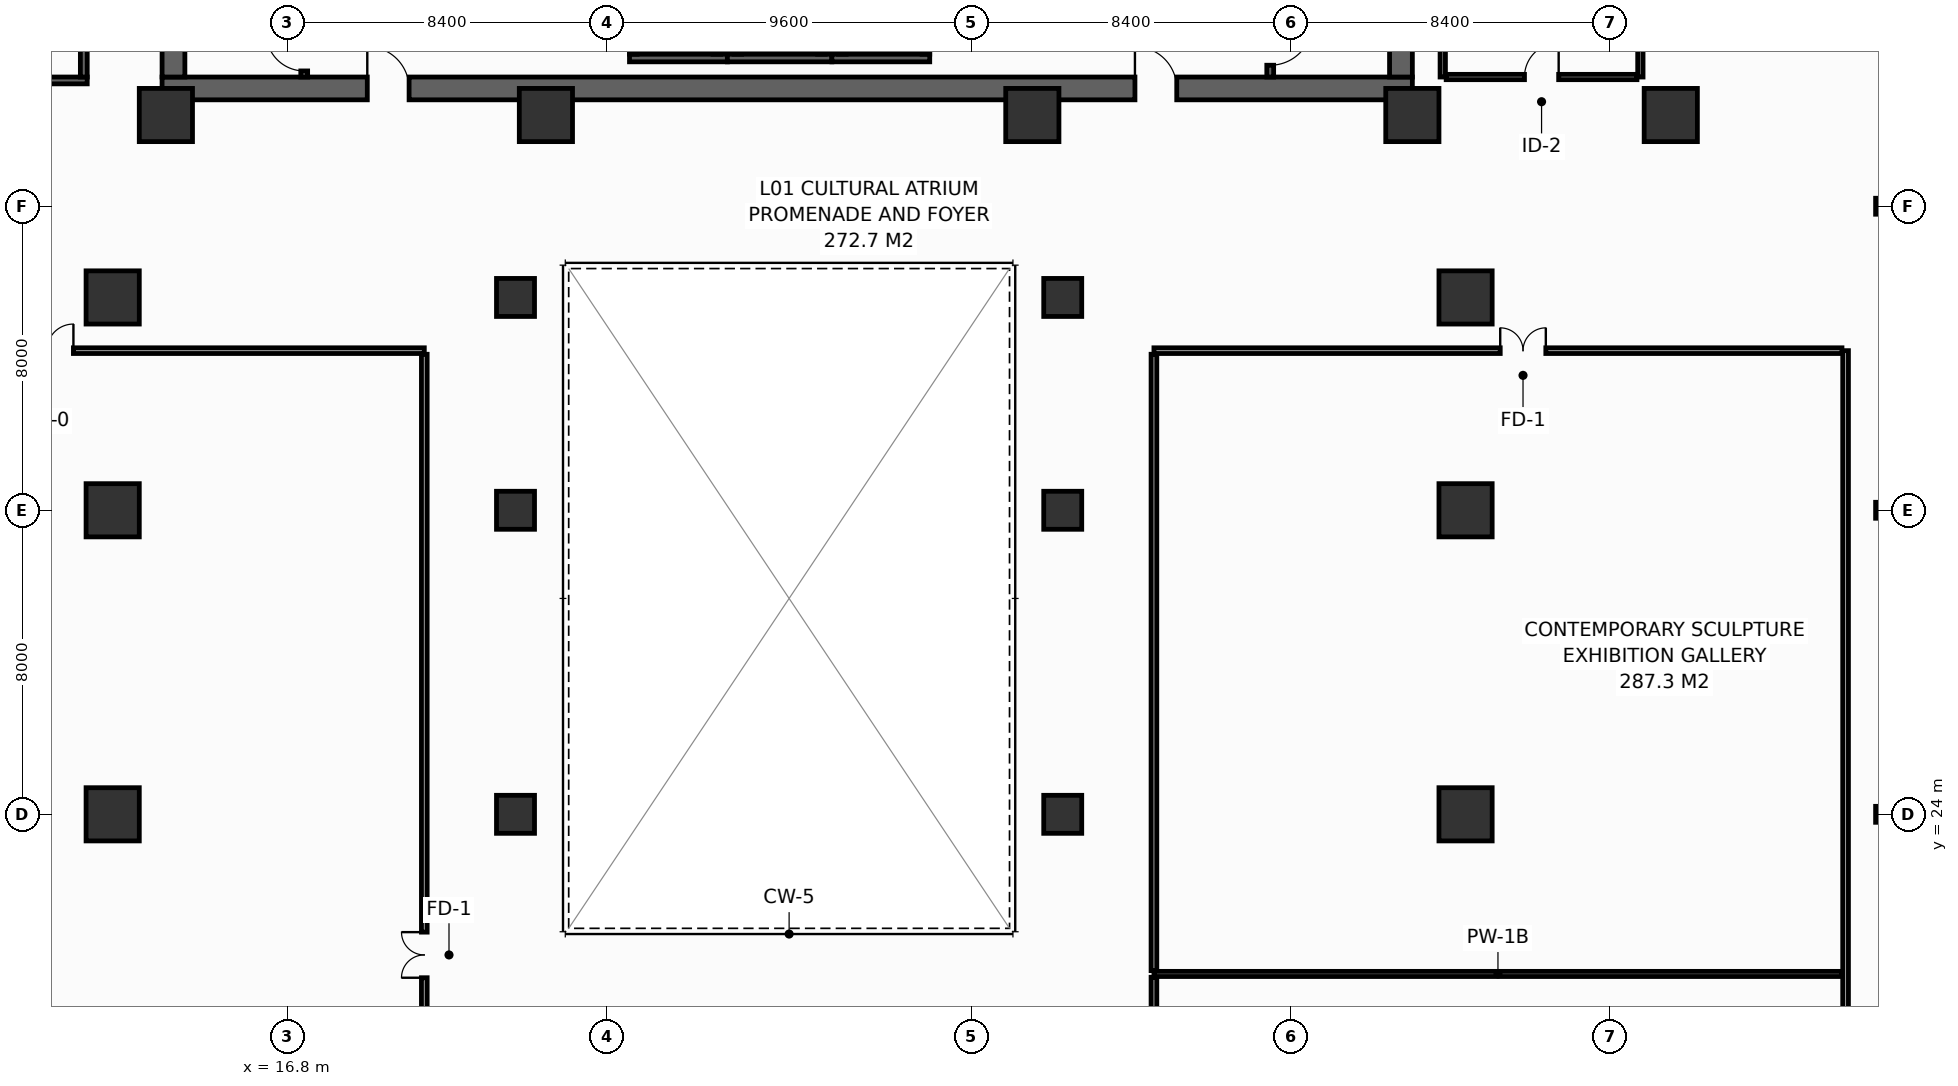
"""IFC4 building model, lengths in metres.
Left out: names, types, materials, properties, quantities, classifications, styles, units other than length and angle.
Written with IfcOpenShell. Run it as: python <this file> out.ifc"""

import sys

from ifc_helpers import new_model, si_unit, direction, frame, frame_2d, origin, origin_2d, place, context, subcontext, project, spatial, rectangle, hollow_rectangle, i_section, extrude, element, fill, save


model = new_model("IFC4")
c1 = context("Model", 3, precision=1e-05, world=origin(), true_north=direction((0.0, 1.0)))
c2 = subcontext(c1, "Body", "Model", "MODEL_VIEW")
j1 = project(units=[si_unit("LENGTHUNIT", "METRE"), si_unit("PLANEANGLEUNIT", "RADIAN")], contexts=[c1])
p1 = place(None, origin())
s1 = spatial("IfcSite", under=j1, at=p1, CompositionType="ELEMENT")
p2 = place(p1, origin())
s2 = spatial("IfcBuilding", under=s1, at=p2, CompositionType="ELEMENT")
p3 = place(p2, frame((0.0, 0.0, 6.0)))
s3 = spatial("IfcBuildingStorey", under=s2, at=p3, CompositionType="ELEMENT", Elevation=6.0)
p4 = place(p3, frame((13.5, 43.1, 0.0), z_axis=(0.0, 0.0, 1.0), x_axis=(1.0, 0.0, 0.0)))
e1 = element("IfcWall", 1, at=p4, inside=s3, PredefinedType="SHEAR", context=c2, shape_type="SweptSolid", body=[
    extrude(rectangle(XDim=32.9, YDim=0.6, at=frame_2d((16.45, 0.0))), origin(), (0.0, 0.0, 1.0), 5.1),
])
p5 = place(p4, frame((5.4, 0.0, 0.0)))
e2 = element("IfcOpeningElement", 2, at=p5, cuts=e1, PredefinedType="OPENING", context=c2, shape_type="SweptSolid", body=[
    extrude(rectangle(XDim=1.1, YDim=2.15, at=frame_2d((0.55, 1.075))), frame((0.0, 0.31, 0.0), z_axis=(0.0, -1.0, 0.0), x_axis=(1.0, 0.0, 0.0)), (0.0, 0.0, 1.0), 0.62),
])
p6 = place(p4, frame((25.6, 0.0, 0.0)))
e3 = element("IfcOpeningElement", 3, at=p6, cuts=e1, PredefinedType="OPENING", context=c2, shape_type="SweptSolid", body=[
    extrude(rectangle(XDim=1.1, YDim=2.15, at=frame_2d((0.55, 1.075))), frame((0.0, 0.31, 0.0), z_axis=(0.0, -1.0, 0.0), x_axis=(1.0, 0.0, 0.0)), (0.0, 0.0, 1.0), 0.62),
])
for number, where, z_axis, x_axis in (
    (4, (13.8, 43.4, 0.0), (0.0, 0.0, 1.0), (0.0, 1.0, 0.0)),
    (5, (46.1, 43.4, 0.0), (0.0, 0.0, 1.0), (0.0, 1.0, 0.0)),
):
    element("IfcWall", number, at=place(p3, frame(where, z_axis=z_axis, x_axis=x_axis)), inside=s3, PredefinedType="SHEAR", context=c2, shape_type="SweptSolid", body=[
        extrude(rectangle(XDim=10.4, YDim=0.6, at=frame_2d((5.2, 0.0))), origin(), (0.0, 0.0, 1.0), 5.1),
    ])
for number, where, z_axis, x_axis in (
    (6, (13.6, 42.4, 0.0), (0.0, 0.0, 1.0), (1.0, 0.0, 0.0)),
    (7, (23.6, 42.4, 0.0), (0.0, 0.0, 1.0), (1.0, 0.0, 0.0)),
    (8, (36.4, 42.4, 0.0), (0.0, 0.0, 1.0), (1.0, 0.0, 0.0)),
    (9, (46.4, 42.4, 0.0), (0.0, 0.0, 1.0), (1.0, 0.0, 0.0)),
    (10, (53.2, 42.4, 0.0), (0.0, 0.0, 1.0), (1.0, 0.0, 0.0)),
    (11, (12.2, 24.0, 0.0), (0.0, 0.0, 1.0), (1.0, 0.0, 0.0)),
):
    element("IfcColumn", number, at=place(p3, frame(where, z_axis=z_axis, x_axis=x_axis)), inside=s3, PredefinedType="COLUMN", context=c2, shape_type="SweptSolid", body=[
        extrude(hollow_rectangle(XDim=1.4, YDim=1.4, WallThickness=0.065, at=origin_2d()), origin(), (0.0, 0.0, 1.0), 5.4),
    ])
for number, where, z_axis, x_axis in (
    (12, (22.8, 24.0, 0.0), (0.0, 0.0, 1.0), (1.0, 0.0, 0.0)),
    (13, (37.2, 24.0, 0.0), (0.0, 0.0, 1.0), (1.0, 0.0, 0.0)),
):
    element("IfcColumn", number, at=place(p3, frame(where, z_axis=z_axis, x_axis=x_axis)), inside=s3, PredefinedType="COLUMN", context=c2, shape_type="SweptSolid", body=[
        extrude(hollow_rectangle(XDim=1.0, YDim=1.0, WallThickness=0.045, at=origin_2d()), origin(), (0.0, 0.0, 1.0), 5.4),
    ])
for number, where, z_axis, x_axis in (
    (14, (47.8, 24.0, 0.0), (0.0, 0.0, 1.0), (1.0, 0.0, 0.0)),
    (15, (12.2, 32.0, 0.0), (0.0, 0.0, 1.0), (1.0, 0.0, 0.0)),
):
    element("IfcColumn", number, at=place(p3, frame(where, z_axis=z_axis, x_axis=x_axis)), inside=s3, PredefinedType="COLUMN", context=c2, shape_type="SweptSolid", body=[
        extrude(hollow_rectangle(XDim=1.4, YDim=1.4, WallThickness=0.065, at=origin_2d()), origin(), (0.0, 0.0, 1.0), 5.4),
    ])
for number, where, z_axis, x_axis in (
    (16, (22.8, 32.0, 0.0), (0.0, 0.0, 1.0), (1.0, 0.0, 0.0)),
    (17, (37.2, 32.0, 0.0), (0.0, 0.0, 1.0), (1.0, 0.0, 0.0)),
):
    element("IfcColumn", number, at=place(p3, frame(where, z_axis=z_axis, x_axis=x_axis)), inside=s3, PredefinedType="COLUMN", context=c2, shape_type="SweptSolid", body=[
        extrude(hollow_rectangle(XDim=1.0, YDim=1.0, WallThickness=0.045, at=origin_2d()), origin(), (0.0, 0.0, 1.0), 5.4),
    ])
for number, where, z_axis, x_axis in (
    (18, (47.8, 32.0, 0.0), (0.0, 0.0, 1.0), (1.0, 0.0, 0.0)),
    (19, (12.2, 37.6, 0.0), (0.0, 0.0, 1.0), (1.0, 0.0, 0.0)),
):
    element("IfcColumn", number, at=place(p3, frame(where, z_axis=z_axis, x_axis=x_axis)), inside=s3, PredefinedType="COLUMN", context=c2, shape_type="SweptSolid", body=[
        extrude(hollow_rectangle(XDim=1.4, YDim=1.4, WallThickness=0.065, at=origin_2d()), origin(), (0.0, 0.0, 1.0), 5.4),
    ])
for number, where, z_axis, x_axis in (
    (20, (22.8, 37.6, 0.0), (0.0, 0.0, 1.0), (1.0, 0.0, 0.0)),
    (21, (37.2, 37.6, 0.0), (0.0, 0.0, 1.0), (1.0, 0.0, 0.0)),
):
    element("IfcColumn", number, at=place(p3, frame(where, z_axis=z_axis, x_axis=x_axis)), inside=s3, PredefinedType="COLUMN", context=c2, shape_type="SweptSolid", body=[
        extrude(hollow_rectangle(XDim=1.0, YDim=1.0, WallThickness=0.045, at=origin_2d()), origin(), (0.0, 0.0, 1.0), 5.4),
    ])
p7 = place(p3, frame((47.8, 37.6, 0.0), z_axis=(0.0, 0.0, 1.0), x_axis=(1.0, 0.0, 0.0)))
e22 = element("IfcColumn", 22, at=p7, inside=s3, PredefinedType="COLUMN", context=c2, shape_type="SweptSolid", body=[
    extrude(hollow_rectangle(XDim=1.4, YDim=1.4, WallThickness=0.065, at=origin_2d()), origin(), (0.0, 0.0, 1.0), 5.4),
])
for number, where, z_axis, x_axis in (
    (23, (58.8, 24.0, 0.0), (0.0, 0.0, 1.0), (1.0, 0.0, 0.0)),
    (24, (58.8, 32.0, 0.0), (0.0, 0.0, 1.0), (1.0, 0.0, 0.0)),
    (25, (58.8, 40.0, 0.0), (0.0, 0.0, 1.0), (1.0, 0.0, 0.0)),
):
    element("IfcColumn", number, at=place(p3, frame(where, z_axis=z_axis, x_axis=x_axis)), inside=s3, PredefinedType="COLUMN", context=c2, shape_type="SweptSolid", body=[
        extrude(i_section(OverallWidth=0.42, OverallDepth=0.42, WebThickness=0.02, FlangeThickness=0.035, FilletRadius=0.022, at=origin_2d()), origin(), (0.0, 0.0, 1.0), 5.4),
    ])
p8 = place(p3, frame((25.8, 43.9, 0.0), z_axis=(0.0, 0.0, 1.0), x_axis=(1.0, 0.0, 0.0)))
e26 = element("IfcWall", 26, at=p8, inside=s3, PredefinedType="SHEAR", context=c2, shape_type="SweptSolid", body=[
    extrude(rectangle(XDim=2.575, YDim=0.2, at=frame_2d((1.288, 0.0))), origin(), (0.0, 0.0, 1.0), 5.1),
])
for number, where, z_axis, x_axis in (
    (27, (25.9, 44.0, 0.0), (0.0, 0.0, 1.0), (0.0, 1.0, 0.0)),
    (28, (28.1, 44.0, 0.0), (0.0, 0.0, 1.0), (0.0, 1.0, 0.0)),
):
    element("IfcWall", number, at=place(p3, frame(where, z_axis=z_axis, x_axis=x_axis)), inside=s3, PredefinedType="SHEAR", context=c2, shape_type="SweptSolid", body=[
        extrude(rectangle(XDim=2.3, YDim=0.2, at=frame_2d((1.15, 0.0))), origin(), (0.0, 0.0, 1.0), 5.1),
    ])
p9 = place(p3, frame((28.375, 43.9, 0.0), z_axis=(0.0, 0.0, 1.0), x_axis=(1.0, 0.0, 0.0)))
e29 = element("IfcWall", 29, at=p9, inside=s3, PredefinedType="SHEAR", context=c2, shape_type="SweptSolid", body=[
    extrude(rectangle(XDim=2.75, YDim=0.2, at=frame_2d((1.375, 0.0))), origin(), (0.0, 0.0, 1.0), 5.1),
])
for number, where, z_axis, x_axis in (
    (30, (28.65, 44.0, 0.0), (0.0, 0.0, 1.0), (0.0, 1.0, 0.0)),
    (31, (30.85, 44.0, 0.0), (0.0, 0.0, 1.0), (0.0, 1.0, 0.0)),
):
    element("IfcWall", number, at=place(p3, frame(where, z_axis=z_axis, x_axis=x_axis)), inside=s3, PredefinedType="SHEAR", context=c2, shape_type="SweptSolid", body=[
        extrude(rectangle(XDim=2.3, YDim=0.2, at=frame_2d((1.15, 0.0))), origin(), (0.0, 0.0, 1.0), 5.1),
    ])
p10 = place(p3, frame((31.125, 43.9, 0.0), z_axis=(0.0, 0.0, 1.0), x_axis=(1.0, 0.0, 0.0)))
e32 = element("IfcWall", 32, at=p10, inside=s3, PredefinedType="SHEAR", context=c2, shape_type="SweptSolid", body=[
    extrude(rectangle(XDim=2.575, YDim=0.2, at=frame_2d((1.288, 0.0))), origin(), (0.0, 0.0, 1.0), 5.1),
])
for number, where, z_axis, x_axis in (
    (33, (31.4, 44.0, 0.0), (0.0, 0.0, 1.0), (0.0, 1.0, 0.0)),
    (34, (33.6, 44.0, 0.0), (0.0, 0.0, 1.0), (0.0, 1.0, 0.0)),
):
    element("IfcWall", number, at=place(p3, frame(where, z_axis=z_axis, x_axis=x_axis)), inside=s3, PredefinedType="SHEAR", context=c2, shape_type="SweptSolid", body=[
        extrude(rectangle(XDim=2.3, YDim=0.2, at=frame_2d((1.15, 0.0))), origin(), (0.0, 0.0, 1.0), 5.1),
    ])
p11 = place(p3, frame((17.24, 43.4, 0.0), z_axis=(0.0, 0.0, 1.0), x_axis=(0.0, 1.0, 0.0)))
e35 = element("IfcWall", 35, at=p11, inside=s3, PredefinedType="SHEAR", context=c2, shape_type="SweptSolid", body=[
    extrude(rectangle(XDim=10.4, YDim=0.18, at=frame_2d((5.2, 0.0))), origin(), (0.0, 0.0, 1.0), 5.1),
])
p12 = place(p11, frame((0.16, 0.0, 0.0)))
e36 = element("IfcOpeningElement", 36, at=p12, cuts=e35, PredefinedType="OPENING", context=c2, shape_type="SweptSolid", body=[
    extrude(rectangle(XDim=1.0, YDim=2.15, at=frame_2d((0.5, 1.075))), frame((0.0, 0.1, 0.0), z_axis=(0.0, -1.0, 0.0), x_axis=(1.0, 0.0, 0.0)), (0.0, 0.0, 1.0), 0.2),
])
p13 = place(p3, frame((42.66, 53.8, 0.0), z_axis=(0.0, 0.0, 1.0), x_axis=(0.0, -1.0, 0.0)))
e37 = element("IfcWall", 37, at=p13, inside=s3, PredefinedType="SHEAR", context=c2, shape_type="SweptSolid", body=[
    extrude(rectangle(XDim=10.4, YDim=0.18, at=frame_2d((5.2, 0.0))), origin(), (0.0, 0.0, 1.0), 5.1),
])
p14 = place(p13, frame((8.99, 0.0, 0.0)))
e38 = element("IfcOpeningElement", 38, at=p14, cuts=e37, PredefinedType="OPENING", context=c2, shape_type="SweptSolid", body=[
    extrude(rectangle(XDim=1.1, YDim=2.15, at=frame_2d((0.55, 1.075))), frame((0.0, 0.1, 0.0), z_axis=(0.0, -1.0, 0.0), x_axis=(1.0, 0.0, 0.0)), (0.0, 0.0, 1.0), 0.2),
])
p15 = place(p3, frame((8.12, 43.31, 0.0), z_axis=(0.0, 0.0, 1.0), x_axis=(1.0, 0.0, 0.0)))
e39 = element("IfcWall", 39, at=p15, inside=s3, PredefinedType="SHEAR", context=c2, shape_type="SweptSolid", body=[
    extrude(rectangle(XDim=3.41, YDim=0.18, at=frame_2d((1.705, 0.0))), origin(), (0.0, 0.0, 1.0), 5.1),
])
p16 = place(p15, frame((1.15, 0.0, 0.0)))
e40 = element("IfcOpeningElement", 40, at=p16, cuts=e39, PredefinedType="OPENING", context=c2, shape_type="SweptSolid", body=[
    extrude(rectangle(XDim=1.1, YDim=2.15, at=frame_2d((0.55, 1.075))), frame((0.0, 0.1, 0.0), z_axis=(0.0, -1.0, 0.0), x_axis=(1.0, 0.0, 0.0)), (0.0, 0.0, 1.0), 0.2),
])
p17 = place(p3, frame((11.44, 43.4, 0.0), z_axis=(0.0, 0.0, 1.0), x_axis=(0.0, 1.0, 0.0)))
e41 = element("IfcWall", 41, at=p17, inside=s3, PredefinedType="SHEAR", context=c2, shape_type="SweptSolid", body=[
    extrude(rectangle(XDim=10.4, YDim=0.18, at=frame_2d((5.2, 0.0))), origin(), (0.0, 0.0, 1.0), 5.1),
])
p18 = place(p3, frame((2.295, 36.2, 0.0), z_axis=(0.0, 0.0, 1.0), x_axis=(1.0, 0.0, 0.0)))
e42 = element("IfcWall", 42, at=p18, inside=s3, PredefinedType="PARTITIONING", context=c2, shape_type="SweptSolid", body=[
    extrude(rectangle(XDim=18.105, YDim=0.15, at=frame_2d((9.052, 0.0))), origin(), (0.0, 0.0, 1.0), 4.185),
])
p19 = place(p18, frame((7.472, 0.0, 0.0)))
e43 = element("IfcOpeningElement", 43, at=p19, cuts=e42, PredefinedType="OPENING", context=c2, shape_type="SweptSolid", body=[
    extrude(rectangle(XDim=1.4, YDim=2.2, at=frame_2d((0.7, 1.1))), frame((0.0, 0.085, 0.0), z_axis=(0.0, -1.0, 0.0), x_axis=(1.0, 0.0, 0.0)), (0.0, 0.0, 1.0), 0.17),
])
p20 = place(p3, frame((20.4, 4.495, 0.0), z_axis=(0.0, 0.0, 1.0), x_axis=(0.0, 1.0, 0.0)))
e44 = element("IfcWall", 44, at=p20, inside=s3, PredefinedType="PARTITIONING", context=c2, shape_type="SweptSolid", body=[
    extrude(rectangle(XDim=31.61, YDim=0.15, at=frame_2d((15.805, 0.0))), origin(), (0.0, 0.0, 1.0), 4.185),
])
p21 = place(p20, frame((15.205, 0.0, 0.0)))
e45 = element("IfcOpeningElement", 45, at=p21, cuts=e44, PredefinedType="OPENING", context=c2, shape_type="SweptSolid", body=[
    extrude(rectangle(XDim=1.2, YDim=2.15, at=frame_2d((0.6, 1.075))), frame((0.0, 0.085, 0.0), z_axis=(0.0, -1.0, 0.0), x_axis=(1.0, 0.0, 0.0)), (0.0, 0.0, 1.0), 0.17),
])
p22 = place(p3, frame((57.8, 4.4, 0.0), z_axis=(0.0, 0.0, 1.0), x_axis=(0.0, 1.0, 0.0)))
e46 = element("IfcWall", 46, at=p22, inside=s3, PredefinedType="PARTITIONING", context=c2, shape_type="SweptSolid", body=[
    extrude(rectangle(XDim=31.8, YDim=0.15, at=frame_2d((15.9, 0.0))), origin(), (0.0, 0.0, 1.0), 4.185),
])
p23 = place(p3, frame((39.6, 19.8, 0.0), z_axis=(0.0, 0.0, 1.0), x_axis=(1.0, 0.0, 0.0)))
e47 = element("IfcWall", 47, at=p23, inside=s3, PredefinedType="PARTITIONING", context=c2, shape_type="SweptSolid", body=[
    extrude(rectangle(XDim=18.105, YDim=0.135, at=frame_2d((9.052, 0.0))), origin(), (0.0, 0.0, 1.0), 4.185),
])
p24 = place(p3, frame((39.6, 36.2, 0.0), z_axis=(0.0, 0.0, 1.0), x_axis=(1.0, 0.0, 0.0)))
e48 = element("IfcWall", 48, at=p24, inside=s3, PredefinedType="PARTITIONING", context=c2, shape_type="SweptSolid", body=[
    extrude(rectangle(XDim=18.105, YDim=0.15, at=frame_2d((9.052, 0.0))), origin(), (0.0, 0.0, 1.0), 4.185),
])
p25 = place(p24, frame((9.112, 0.0, 0.0)))
e49 = element("IfcOpeningElement", 49, at=p25, cuts=e48, PredefinedType="OPENING", context=c2, shape_type="SweptSolid", body=[
    extrude(rectangle(XDim=1.2, YDim=2.15, at=frame_2d((0.6, 1.075))), frame((0.0, 0.085, 0.0), z_axis=(0.0, -1.0, 0.0), x_axis=(1.0, 0.0, 0.0)), (0.0, 0.0, 1.0), 0.17),
])
p26 = place(p3, frame((39.6, 4.495, 0.0), z_axis=(0.0, 0.0, 1.0), x_axis=(0.0, 1.0, 0.0)))
e50 = element("IfcWall", 50, at=p26, inside=s3, PredefinedType="PARTITIONING", context=c2, shape_type="SweptSolid", body=[
    extrude(rectangle(XDim=15.217, YDim=0.15, at=frame_2d((7.609, 0.0))), origin(), (0.0, 0.0, 1.0), 4.185),
])
p27 = place(p26, frame((7.084, 0.0, 0.0)))
e51 = element("IfcOpeningElement", 51, at=p27, cuts=e50, PredefinedType="OPENING", context=c2, shape_type="SweptSolid", body=[
    extrude(rectangle(XDim=1.05, YDim=2.15, at=frame_2d((0.525, 1.075))), frame((0.0, 0.085, 0.0), z_axis=(0.0, -1.0, 0.0), x_axis=(1.0, 0.0, 0.0)), (0.0, 0.0, 1.0), 0.17),
])
p28 = place(p3, frame((39.6, 19.887, 0.0), z_axis=(0.0, 0.0, 1.0), x_axis=(0.0, 1.0, 0.0)))
e52 = element("IfcWall", 52, at=p28, inside=s3, PredefinedType="PARTITIONING", context=c2, shape_type="SweptSolid", body=[
    extrude(rectangle(XDim=16.218, YDim=0.15, at=frame_2d((8.109, 0.0))), origin(), (0.0, 0.0, 1.0), 4.185),
])
p29 = place(p3, frame((47.2, 43.4, 0.0), z_axis=(0.0, 0.0, 1.0), x_axis=(0.0, 1.0, 0.0)))
e53 = element("IfcWall", 53, at=p29, inside=s3, PredefinedType="PARTITIONING", context=c2, shape_type="SweptSolid", body=[
    extrude(rectangle(XDim=4.8, YDim=0.14, at=frame_2d((2.4, 0.0))), origin(), (0.0, 0.0, 1.0), 5.1),
])
p30 = place(p3, frame((52.4, 43.4, 0.0), z_axis=(0.0, 0.0, 1.0), x_axis=(0.0, 1.0, 0.0)))
e54 = element("IfcWall", 54, at=p30, inside=s3, PredefinedType="PARTITIONING", context=c2, shape_type="SweptSolid", body=[
    extrude(rectangle(XDim=4.71, YDim=0.14, at=frame_2d((2.355, 0.0))), origin(), (0.0, 0.0, 1.0), 5.1),
])
p31 = place(p3, frame((47.29, 43.4, 0.0), z_axis=(0.0, 0.0, 1.0), x_axis=(1.0, 0.0, 0.0)))
e55 = element("IfcWall", 55, at=p31, inside=s3, PredefinedType="PARTITIONING", context=c2, shape_type="SweptSolid", body=[
    extrude(rectangle(XDim=5.02, YDim=0.14, at=frame_2d((2.51, 0.0))), origin(), (0.0, 0.0, 1.0), 5.1),
])
p32 = place(p31, frame((2.06, 0.0, 0.0)))
e56 = element("IfcOpeningElement", 56, at=p32, cuts=e55, PredefinedType="OPENING", context=c2, shape_type="SweptSolid", body=[
    extrude(rectangle(XDim=0.9, YDim=2.1, at=frame_2d((0.45, 1.05))), frame((0.0, 0.08, 0.0), z_axis=(0.0, -1.0, 0.0), x_axis=(1.0, 0.0, 0.0)), (0.0, 0.0, 1.0), 0.16),
])
p33 = place(p12, origin())
e57 = element("IfcDoor", 57, at=p33, inside=s3, OperationType="SINGLE_SWING_RIGHT", PredefinedType="DOOR", context=c2, shape_type="SweptSolid", body=[
    extrude(rectangle(XDim=1.0, YDim=2.15, at=frame_2d((0.5, 1.075))), frame((0.0, 0.025, 0.0), z_axis=(0.0, -1.0, 0.0), x_axis=(1.0, 0.0, 0.0)), (0.0, 0.0, 1.0), 0.05),
])
fill(e36, e57)
p34 = place(p14, origin())
e58 = element("IfcDoor", 58, at=p34, inside=s3, OperationType="SINGLE_SWING_LEFT", PredefinedType="DOOR", context=c2, shape_type="SweptSolid", body=[
    extrude(rectangle(XDim=1.1, YDim=2.15, at=frame_2d((0.55, 1.075))), frame((0.0, 0.025, 0.0), z_axis=(0.0, -1.0, 0.0), x_axis=(1.0, 0.0, 0.0)), (0.0, 0.0, 1.0), 0.05),
])
fill(e38, e58)
p35 = place(p5, origin())
e59 = element("IfcDoor", 59, at=p35, inside=s3, OperationType="SINGLE_SWING_LEFT", PredefinedType="DOOR", context=c2, shape_type="SweptSolid", body=[
    extrude(rectangle(XDim=1.1, YDim=2.15, at=frame_2d((0.55, 1.075))), frame((0.0, 0.025, 0.0), z_axis=(0.0, -1.0, 0.0), x_axis=(1.0, 0.0, 0.0)), (0.0, 0.0, 1.0), 0.05),
])
fill(e2, e59)
p36 = place(p6, origin())
e60 = element("IfcDoor", 60, at=p36, inside=s3, OperationType="SINGLE_SWING_LEFT", PredefinedType="DOOR", context=c2, shape_type="SweptSolid", body=[
    extrude(rectangle(XDim=1.1, YDim=2.15, at=frame_2d((0.55, 1.075))), frame((0.0, 0.025, 0.0), z_axis=(0.0, -1.0, 0.0), x_axis=(1.0, 0.0, 0.0)), (0.0, 0.0, 1.0), 0.05),
])
fill(e3, e60)
p37 = place(p19, origin())
e61 = element("IfcDoor", 61, at=p37, inside=s3, OperationType="DOUBLE_DOOR_SINGLE_SWING", PredefinedType="DOOR", context=c2, shape_type="SweptSolid", body=[
    extrude(rectangle(XDim=1.4, YDim=2.2, at=frame_2d((0.7, 1.1))), frame((0.0, 0.025, 0.0), z_axis=(0.0, -1.0, 0.0), x_axis=(1.0, 0.0, 0.0)), (0.0, 0.0, 1.0), 0.05),
])
fill(e43, e61)
p38 = place(p21, origin())
e62 = element("IfcDoor", 62, at=p38, inside=s3, OperationType="DOUBLE_DOOR_SINGLE_SWING", PredefinedType="DOOR", context=c2, shape_type="SweptSolid", body=[
    extrude(rectangle(XDim=1.2, YDim=2.15, at=frame_2d((0.6, 1.075))), frame((0.0, 0.025, 0.0), z_axis=(0.0, -1.0, 0.0), x_axis=(1.0, 0.0, 0.0)), (0.0, 0.0, 1.0), 0.05),
])
fill(e45, e62)
p39 = place(p25, origin())
e63 = element("IfcDoor", 63, at=p39, inside=s3, OperationType="DOUBLE_DOOR_SINGLE_SWING", PredefinedType="DOOR", context=c2, shape_type="SweptSolid", body=[
    extrude(rectangle(XDim=1.2, YDim=2.15, at=frame_2d((0.6, 1.075))), frame((0.0, 0.025, 0.0), z_axis=(0.0, -1.0, 0.0), x_axis=(1.0, 0.0, 0.0)), (0.0, 0.0, 1.0), 0.05),
])
fill(e49, e63)
p40 = place(p32, origin())
e64 = element("IfcDoor", 64, at=p40, inside=s3, OperationType="SINGLE_SWING_RIGHT", PredefinedType="DOOR", context=c2, shape_type="SweptSolid", body=[
    extrude(rectangle(XDim=0.9, YDim=2.1, at=frame_2d((0.45, 1.05))), frame((0.0, 0.025, 0.0), z_axis=(0.0, -1.0, 0.0), x_axis=(1.0, 0.0, 0.0)), (0.0, 0.0, 1.0), 0.05),
])
fill(e56, e64)
save(model, sys.argv[1])
